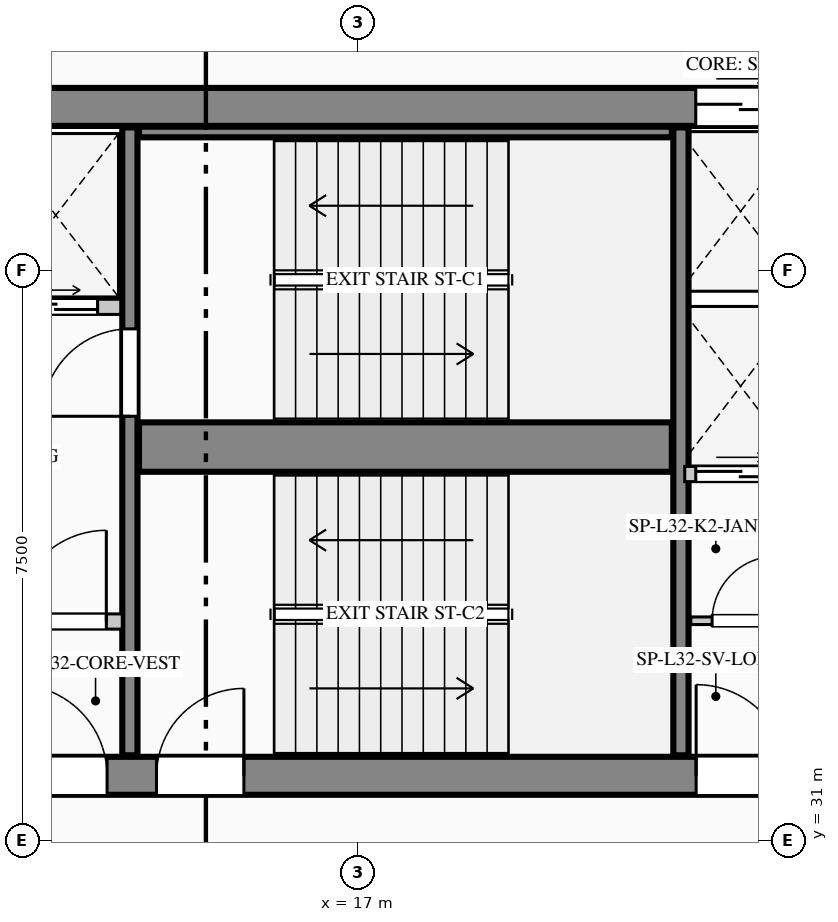
"""IFC4 building model, lengths in metres.
Left out: names, types, materials, properties, quantities, classifications, styles, units other than length and angle.
Written with IfcOpenShell. Run it as: python <this file> out.ifc"""

import sys

from ifc_helpers import new_model, si_unit, direction, frame, frame_2d, origin, place, context, subcontext, project, spatial, rectangle, extrude, element, fill, save


model = new_model("IFC4")
c1 = context("Model", 3, precision=1e-05, world=origin(), true_north=direction((0.0, 1.0)))
c2 = subcontext(c1, "Body", "Model", "MODEL_VIEW")
j1 = project(units=[si_unit("LENGTHUNIT", "METRE"), si_unit("PLANEANGLEUNIT", "RADIAN")], contexts=[c1])
p1 = place(None, origin())
s1 = spatial("IfcSite", under=j1, at=p1, CompositionType="ELEMENT")
p2 = place(p1, origin())
s2 = spatial("IfcBuilding", under=s1, at=p2, CompositionType="ELEMENT")
p3 = place(p2, frame((0.0, 0.0, 139.05)))
s3 = spatial("IfcBuildingStorey", under=s2, at=p3, CompositionType="ELEMENT", Elevation=139.05)
p4 = place(p3, frame((5.5, 40.65, 0.0), z_axis=(0.0, 0.0, 1.0), x_axis=(1.0, 0.0, 0.0)))
e1 = element("IfcWall", 1, at=p4, inside=s3, PredefinedType="SHEAR", context=c2, shape_type="SweptSolid", body=[
    extrude(rectangle(XDim=17.85, YDim=0.5, at=frame_2d((8.925, 0.0))), origin(), (0.0, 0.0, 1.0), 3.95),
])
p5 = place(p4, frame((15.945, 0.0, 0.0)))
e2 = element("IfcOpeningElement", 2, at=p5, cuts=e1, PredefinedType="OPENING", context=c2, shape_type="SweptSolid", body=[
    extrude(rectangle(XDim=1.18, YDim=2.25, at=frame_2d((0.59, 1.125))), frame((0.0, 0.26, 0.0), z_axis=(0.0, -1.0, 0.0), x_axis=(1.0, 0.0, 0.0)), (0.0, 0.0, 1.0), 0.52),
])
p6 = place(p3, frame((5.5, 31.85, 0.0), z_axis=(0.0, 0.0, 1.0), x_axis=(1.0, 0.0, 0.0)))
e3 = element("IfcWall", 3, at=p6, inside=s3, PredefinedType="SHEAR", context=c2, shape_type="SweptSolid", body=[
    extrude(rectangle(XDim=17.85, YDim=0.5, at=frame_2d((8.925, 0.0))), origin(), (0.0, 0.0, 1.0), 3.95),
])
p7 = place(p6, frame((3.15, 0.0, 0.0)))
e4 = element("IfcOpeningElement", 4, at=p7, cuts=e3, PredefinedType="OPENING", context=c2, shape_type="SweptSolid", body=[
    extrude(rectangle(XDim=1.2, YDim=2.2, at=frame_2d((0.6, 1.1))), frame((0.0, 0.26, 0.0), z_axis=(0.0, -1.0, 0.0), x_axis=(1.0, 0.0, 0.0)), (0.0, 0.0, 1.0), 0.52),
])
p8 = place(p6, frame((7.0, 0.0, 0.0)))
e5 = element("IfcOpeningElement", 5, at=p8, cuts=e3, PredefinedType="OPENING", context=c2, shape_type="SweptSolid", body=[
    extrude(rectangle(XDim=1.2, YDim=2.2, at=frame_2d((0.6, 1.1))), frame((0.0, 0.26, 0.0), z_axis=(0.0, -1.0, 0.0), x_axis=(1.0, 0.0, 0.0)), (0.0, 0.0, 1.0), 0.52),
])
p9 = place(p6, frame((8.85, 0.0, 0.0)))
e6 = element("IfcOpeningElement", 6, at=p9, cuts=e3, PredefinedType="OPENING", context=c2, shape_type="SweptSolid", body=[
    extrude(rectangle(XDim=1.15, YDim=2.2, at=frame_2d((0.575, 1.1))), frame((0.0, 0.26, 0.0), z_axis=(0.0, -1.0, 0.0), x_axis=(1.0, 0.0, 0.0)), (0.0, 0.0, 1.0), 0.52),
])
p10 = place(p6, frame((15.95, 0.0, 0.0)))
e7 = element("IfcOpeningElement", 7, at=p10, cuts=e3, PredefinedType="OPENING", context=c2, shape_type="SweptSolid", body=[
    extrude(rectangle(XDim=1.2, YDim=2.2, at=frame_2d((0.6, 1.1))), frame((0.0, 0.26, 0.0), z_axis=(0.0, -1.0, 0.0), x_axis=(1.0, 0.0, 0.0)), (0.0, 0.0, 1.0), 0.52),
])
p11 = place(p3, frame((14.0, 32.12, 0.0), z_axis=(0.0, 0.0, 1.0), x_axis=(0.0, 1.0, 0.0)))
e8 = element("IfcWall", 8, at=p11, inside=s3, PredefinedType="SHEAR", context=c2, shape_type="SweptSolid", body=[
    extrude(rectangle(XDim=8.26, YDim=0.2, at=frame_2d((4.13, 0.0))), origin(), (0.0, 0.0, 1.0), 3.95),
])
p12 = place(p11, frame((4.46, 0.0, 0.0)))
e9 = element("IfcOpeningElement", 9, at=p12, cuts=e8, PredefinedType="OPENING", context=c2, shape_type="SweptSolid", body=[
    extrude(rectangle(XDim=1.15, YDim=2.2, at=frame_2d((0.575, 1.1))), frame((0.0, 0.11, 0.0), z_axis=(0.0, -1.0, 0.0), x_axis=(1.0, 0.0, 0.0)), (0.0, 0.0, 1.0), 0.22),
])
p13 = place(p3, frame((14.12, 36.175, 0.0), z_axis=(0.0, 0.0, 1.0), x_axis=(1.0, 0.0, 0.0)))
e10 = element("IfcWall", 10, at=p13, inside=s3, PredefinedType="SHEAR", context=c2, shape_type="SweptSolid", body=[
    extrude(rectangle(XDim=7.01, YDim=0.65, at=frame_2d((3.505, 0.0))), origin(), (0.0, 0.0, 1.0), 3.95),
])
p14 = place(p3, frame((21.25, 32.12, 0.0), z_axis=(0.0, 0.0, 1.0), x_axis=(0.0, 1.0, 0.0)))
e11 = element("IfcWall", 11, at=p14, inside=s3, PredefinedType="SHEAR", context=c2, shape_type="SweptSolid", body=[
    extrude(rectangle(XDim=8.26, YDim=0.2, at=frame_2d((4.13, 0.0))), origin(), (0.0, 0.0, 1.0), 3.95),
])
p15 = place(p3, frame((14.12, 40.32, 0.0), z_axis=(0.0, 0.0, 1.0), x_axis=(1.0, 0.0, 0.0)))
e12 = element("IfcWall", 12, at=p15, inside=s3, PredefinedType="SHEAR", context=c2, shape_type="SweptSolid", body=[
    extrude(rectangle(XDim=7.01, YDim=0.14, at=frame_2d((3.505, 0.0))), origin(), (0.0, 0.0, 1.0), 3.95),
])
p16 = place(p3, frame((10.34, 38.02, 0.0), z_axis=(0.0, 0.0, 1.0), x_axis=(1.0, 0.0, 0.0)))
e13 = element("IfcWall", 13, at=p16, inside=s3, PredefinedType="PARTITIONING", context=c2, shape_type="SweptSolid", body=[
    extrude(rectangle(XDim=3.54, YDim=0.2, at=frame_2d((1.77, 0.0))), origin(), (0.0, 0.0, 1.0), 3.69),
])
p17 = place(p16, frame((0.285, 0.0, 0.0)))
e14 = element("IfcOpeningElement", 14, at=p17, cuts=e13, PredefinedType="OPENING", context=c2, shape_type="SweptSolid", body=[
    extrude(rectangle(XDim=1.1, YDim=2.2, at=frame_2d((0.55, 1.1))), frame((0.0, 0.11, 0.0), z_axis=(0.0, -1.0, 0.0), x_axis=(1.0, 0.0, 0.0)), (0.0, 0.0, 1.0), 0.22),
])
p18 = place(p16, frame((2.135, 0.0, 0.0)))
e15 = element("IfcOpeningElement", 15, at=p18, cuts=e13, PredefinedType="OPENING", context=c2, shape_type="SweptSolid", body=[
    extrude(rectangle(XDim=1.1, YDim=2.2, at=frame_2d((0.55, 1.1))), frame((0.0, 0.11, 0.0), z_axis=(0.0, -1.0, 0.0), x_axis=(1.0, 0.0, 0.0)), (0.0, 0.0, 1.0), 0.22),
])
p19 = place(p3, frame((10.34, 33.88, 0.0), z_axis=(0.0, 0.0, 1.0), x_axis=(1.0, 0.0, 0.0)))
e16 = element("IfcWall", 16, at=p19, inside=s3, PredefinedType="PARTITIONING", context=c2, shape_type="SweptSolid", body=[
    extrude(rectangle(XDim=3.56, YDim=0.2, at=frame_2d((1.78, 0.0))), origin(), (0.0, 0.0, 1.0), 3.69),
])
p20 = place(p19, frame((2.15, 0.0, 0.0)))
e17 = element("IfcOpeningElement", 17, at=p20, cuts=e16, PredefinedType="OPENING", context=c2, shape_type="SweptSolid", body=[
    extrude(rectangle(XDim=1.2, YDim=2.2, at=frame_2d((0.6, 1.1))), frame((0.0, 0.11, 0.0), z_axis=(0.0, -1.0, 0.0), x_axis=(1.0, 0.0, 0.0)), (0.0, 0.0, 1.0), 0.22),
])
p21 = place(p3, frame((21.38, 33.89, 0.0), z_axis=(0.0, 0.0, 1.0), x_axis=(1.0, 0.0, 0.0)))
e18 = element("IfcWall", 18, at=p21, inside=s3, PredefinedType="PARTITIONING", context=c2, shape_type="SweptSolid", body=[
    extrude(rectangle(XDim=1.42, YDim=0.1, at=frame_2d((0.71, 0.0))), origin(), (0.0, 0.0, 1.0), 3.69),
])
p22 = place(p21, frame((0.28, 0.0, 0.0)))
e19 = element("IfcOpeningElement", 19, at=p22, cuts=e18, PredefinedType="OPENING", context=c2, shape_type="SweptSolid", body=[
    extrude(rectangle(XDim=0.85, YDim=2.1, at=frame_2d((0.425, 1.05))), frame((0.0, 0.06, 0.0), z_axis=(0.0, -1.0, 0.0), x_axis=(1.0, 0.0, 0.0)), (0.0, 0.0, 1.0), 0.12),
])
p23 = place(p3, frame((21.3, 35.82, 0.0), z_axis=(0.0, 0.0, 1.0), x_axis=(1.0, 0.0, 0.0)))
e20 = element("IfcWall", 20, at=p23, inside=s3, PredefinedType="PARTITIONING", context=c2, shape_type="SweptSolid", body=[
    extrude(rectangle(XDim=1.5, YDim=0.2, at=frame_2d((0.75, 0.0))), origin(), (0.0, 0.0, 1.0), 3.69),
])
p24 = place(p23, frame((0.145, 0.0, 0.0)))
e21 = element("IfcOpeningElement", 21, at=p24, cuts=e20, PredefinedType="OPENING", context=c2, shape_type="SweptSolid", body=[
    extrude(rectangle(XDim=1.18, YDim=2.25, at=frame_2d((0.59, 1.125))), frame((0.0, 0.11, 0.0), z_axis=(0.0, -1.0, 0.0), x_axis=(1.0, 0.0, 0.0)), (0.0, 0.0, 1.0), 0.22),
])
p25 = place(p8, origin())
e22 = element("IfcDoor", 22, at=p25, inside=s3, OperationType="SINGLE_SWING_LEFT", PredefinedType="DOOR", context=c2, shape_type="SweptSolid", body=[
    extrude(rectangle(XDim=1.2, YDim=2.2, at=frame_2d((0.6, 1.1))), frame((0.0, 0.025, 0.0), z_axis=(0.0, -1.0, 0.0), x_axis=(1.0, 0.0, 0.0)), (0.0, 0.0, 1.0), 0.05),
])
fill(e5, e22)
p26 = place(p9, origin())
e23 = element("IfcDoor", 23, at=p26, inside=s3, OperationType="SINGLE_SWING_RIGHT", PredefinedType="DOOR", context=c2, shape_type="SweptSolid", body=[
    extrude(rectangle(XDim=1.15, YDim=2.2, at=frame_2d((0.575, 1.1))), frame((0.0, 0.025, 0.0), z_axis=(0.0, -1.0, 0.0), x_axis=(1.0, 0.0, 0.0)), (0.0, 0.0, 1.0), 0.05),
])
fill(e6, e23)
p27 = place(p10, origin())
e24 = element("IfcDoor", 24, at=p27, inside=s3, OperationType="SINGLE_SWING_LEFT", PredefinedType="DOOR", context=c2, shape_type="SweptSolid", body=[
    extrude(rectangle(XDim=1.2, YDim=2.2, at=frame_2d((0.6, 1.1))), frame((0.0, 0.025, 0.0), z_axis=(0.0, -1.0, 0.0), x_axis=(1.0, 0.0, 0.0)), (0.0, 0.0, 1.0), 0.05),
])
fill(e7, e24)
p28 = place(p20, origin())
e25 = element("IfcDoor", 25, at=p28, inside=s3, OperationType="SINGLE_SWING_RIGHT", PredefinedType="DOOR", context=c2, shape_type="SweptSolid", body=[
    extrude(rectangle(XDim=1.2, YDim=2.2, at=frame_2d((0.6, 1.1))), frame((0.0, 0.025, 0.0), z_axis=(0.0, -1.0, 0.0), x_axis=(1.0, 0.0, 0.0)), (0.0, 0.0, 1.0), 0.05),
])
fill(e17, e25)
p29 = place(p22, origin())
e26 = element("IfcDoor", 26, at=p29, inside=s3, OperationType="SINGLE_SWING_RIGHT", PredefinedType="DOOR", context=c2, shape_type="SweptSolid", body=[
    extrude(rectangle(XDim=0.85, YDim=2.1, at=frame_2d((0.425, 1.05))), frame((0.0, 0.025, 0.0), z_axis=(0.0, -1.0, 0.0), x_axis=(1.0, 0.0, 0.0)), (0.0, 0.0, 1.0), 0.05),
])
fill(e19, e26)
p30 = place(p12, origin())
e27 = element("IfcDoor", 27, at=p30, inside=s3, OperationType="SINGLE_SWING_LEFT", PredefinedType="DOOR", context=c2, shape_type="SweptSolid", body=[
    extrude(rectangle(XDim=1.15, YDim=2.2, at=frame_2d((0.575, 1.1))), frame((0.0, 0.025, 0.0), z_axis=(0.0, -1.0, 0.0), x_axis=(1.0, 0.0, 0.0)), (0.0, 0.0, 1.0), 0.05),
])
fill(e9, e27)
p31 = place(p18, origin())
e28 = element("IfcDoor", 28, at=p31, inside=s3, OperationType="DOUBLE_DOOR_SLIDING", PredefinedType="DOOR", context=c2, shape_type="SweptSolid", body=[
    extrude(rectangle(XDim=1.1, YDim=2.2, at=frame_2d((0.55, 1.1))), frame((0.0, 0.025, 0.0), z_axis=(0.0, -1.0, 0.0), x_axis=(1.0, 0.0, 0.0)), (0.0, 0.0, 1.0), 0.05),
])
fill(e15, e28)
p32 = place(p5, origin())
e29 = element("IfcDoor", 29, at=p32, inside=s3, OperationType="DOUBLE_DOOR_SLIDING", PredefinedType="DOOR", context=c2, shape_type="SweptSolid", body=[
    extrude(rectangle(XDim=1.18, YDim=2.25, at=frame_2d((0.59, 1.125))), frame((0.0, 0.025, 0.0), z_axis=(0.0, -1.0, 0.0), x_axis=(1.0, 0.0, 0.0)), (0.0, 0.0, 1.0), 0.05),
])
fill(e2, e29)
p33 = place(p24, origin())
e30 = element("IfcDoor", 30, at=p33, inside=s3, OperationType="DOUBLE_DOOR_SLIDING", PredefinedType="DOOR", context=c2, shape_type="SweptSolid", body=[
    extrude(rectangle(XDim=1.18, YDim=2.25, at=frame_2d((0.59, 1.125))), frame((0.0, 0.025, 0.0), z_axis=(0.0, -1.0, 0.0), x_axis=(1.0, 0.0, 0.0)), (0.0, 0.0, 1.0), 0.05),
])
fill(e21, e30)
save(model, sys.argv[1])
